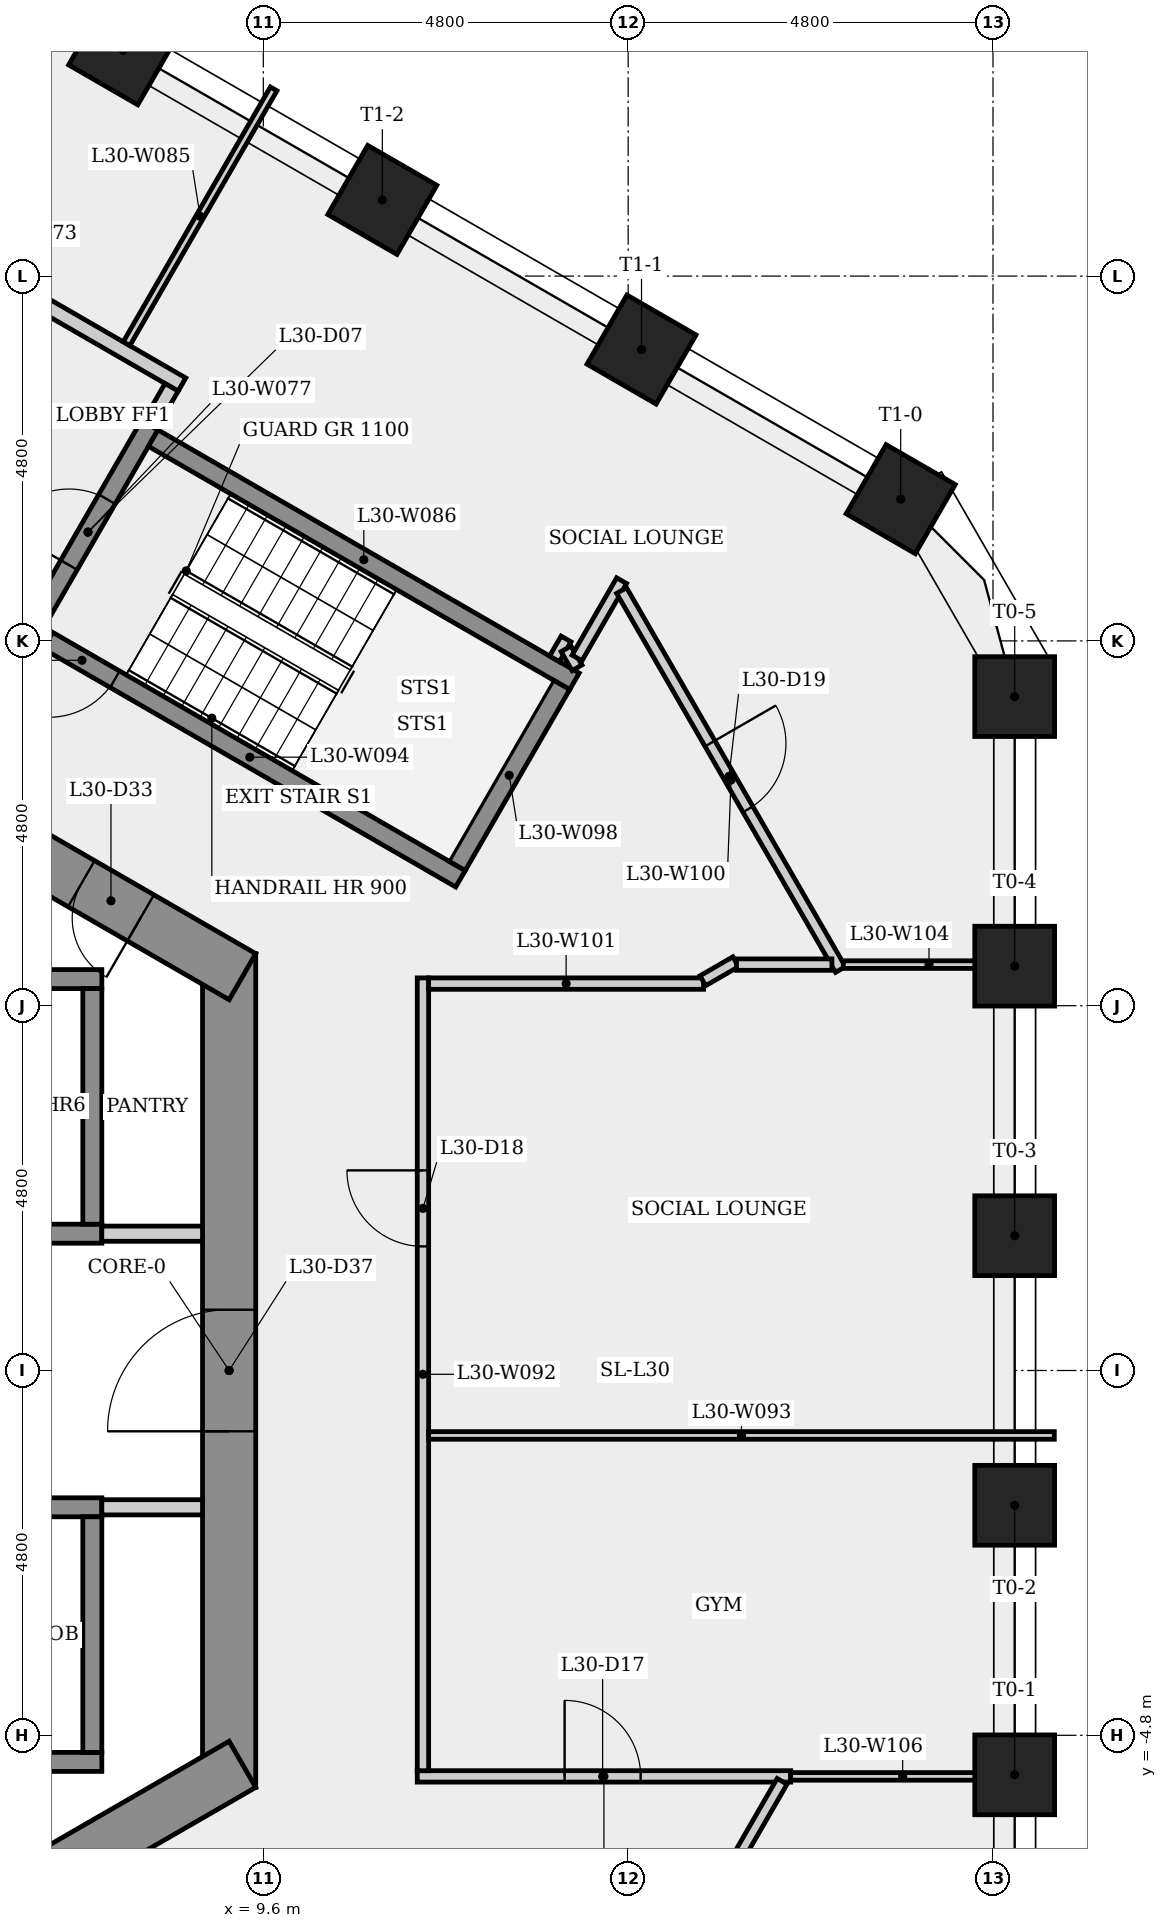
"""IFC4 building model, lengths in metres.
Left out: names, types, materials, properties, quantities, classifications, styles, units other than length and angle.
Written with IfcOpenShell. Run it as: python <this file> out.ifc"""

import sys

from ifc_helpers import new_model, si_unit, direction, frame, frame_2d, origin, origin_2d, place, context, subcontext, project, spatial, rectangle, extrude, element, fill, save


model = new_model("IFC4")
c1 = context("Model", 3, precision=1e-05, world=origin(), true_north=direction((0.0, 1.0)))
c2 = subcontext(c1, "Body", "Model", "MODEL_VIEW")
j1 = project(units=[si_unit("LENGTHUNIT", "METRE"), si_unit("PLANEANGLEUNIT", "RADIAN")], contexts=[c1])
p1 = place(None, origin())
s1 = spatial("IfcSite", under=j1, at=p1, CompositionType="ELEMENT")
p2 = place(p1, origin())
s2 = spatial("IfcBuilding", under=s1, at=p2, CompositionType="ELEMENT")
p3 = place(p2, frame((0.0, 0.0, 113.7)))
s3 = spatial("IfcBuildingStorey", under=s2, at=p3, CompositionType="ELEMENT", Elevation=113.7)
p4 = place(p3, frame((9.15, -5.485, 0.0), z_axis=(0.0, 0.0, 1.0), x_axis=(0.0, 1.0, 0.0)))
e1 = element("IfcWall", 1, at=p4, inside=s3, PredefinedType="SHEAR", context=c2, shape_type="SweptSolid", body=[
    extrude(rectangle(XDim=10.97, YDim=0.7, at=frame_2d((5.485, 0.0))), origin(), (0.0, 0.0, 1.0), 3.4),
])
p5 = place(p4, frame((4.685, 0.0, 0.0)))
e2 = element("IfcOpeningElement", 2, at=p5, cuts=e1, PredefinedType="OPENING", context=c2, shape_type="SweptSolid", body=[
    extrude(rectangle(XDim=1.6, YDim=2.1, at=frame_2d((0.8, 1.05))), frame((0.0, 0.36, 0.0), z_axis=(0.0, -1.0, 0.0), x_axis=(1.0, 0.0, 0.0)), (0.0, 0.0, 1.0), 0.72),
])
p6 = place(p3, frame((9.325, 5.182, 0.0), z_axis=(0.0, 0.0, 1.0), x_axis=(-0.866023993627, 0.500002442456, 0.0)))
e3 = element("IfcWall", 3, at=p6, inside=s3, PredefinedType="SHEAR", context=c2, shape_type="SweptSolid", body=[
    extrude(rectangle(XDim=10.97, YDim=0.7, at=frame_2d((5.485, 0.0))), origin(), (0.0, 0.0, 1.0), 3.4),
])
p7 = place(p6, frame((8.267, 0.0, 0.0)))
e4 = element("IfcOpeningElement", 4, at=p7, cuts=e3, PredefinedType="OPENING", context=c2, shape_type="SweptSolid", body=[
    extrude(rectangle(XDim=0.9, YDim=2.1, at=frame_2d((0.45, 1.05))), frame((0.0, 0.36, 0.0), z_axis=(0.0, -1.0, 0.0), x_axis=(1.0, 0.0, 0.0)), (0.0, 0.0, 1.0), 0.72),
])
p8 = place(p6, frame((1.547, 0.0, 0.0)))
e5 = element("IfcOpeningElement", 5, at=p8, cuts=e3, PredefinedType="OPENING", context=c2, shape_type="SweptSolid", body=[
    extrude(rectangle(XDim=0.9, YDim=2.1, at=frame_2d((0.45, 1.05))), frame((0.0, 0.36, 0.0), z_axis=(0.0, -1.0, 0.0), x_axis=(1.0, 0.0, 0.0)), (0.0, 0.0, 1.0), 0.72),
])
p9 = place(p3, frame((-0.175, -10.667, 0.0), z_axis=(0.0, 0.0, 1.0), x_axis=(0.866023993627, 0.500002442456, 0.0)))
e6 = element("IfcWall", 6, at=p9, inside=s3, PredefinedType="SHEAR", context=c2, shape_type="SweptSolid", body=[
    extrude(rectangle(XDim=10.97, YDim=0.7, at=frame_2d((5.485, 0.0))), origin(), (0.0, 0.0, 1.0), 3.4),
])
p10 = place(p9, frame((6.906, 0.0, 0.0)))
e7 = element("IfcOpeningElement", 7, at=p10, cuts=e6, PredefinedType="OPENING", context=c2, shape_type="SweptSolid", body=[
    extrude(rectangle(XDim=0.9, YDim=2.1, at=frame_2d((0.45, 1.05))), frame((0.0, 0.36, 0.0), z_axis=(0.0, -1.0, 0.0), x_axis=(1.0, 0.0, 0.0)), (0.0, 0.0, 1.0), 0.72),
])
for number, where, z_axis, x_axis in (
    (8, (19.486, -5.32, 0.0), (0.0, 0.0, 1.0), (1.0, 0.0, 0.0)),
    (9, (19.486, -1.773, 0.0), (0.0, 0.0, 1.0), (1.0, 0.0, 0.0)),
    (10, (19.486, 1.773, 0.0), (0.0, 0.0, 1.0), (1.0, 0.0, 0.0)),
    (11, (19.486, 5.32, 0.0), (0.0, 0.0, 1.0), (1.0, 0.0, 0.0)),
    (12, (19.486, 8.867, 0.0), (0.0, 0.0, 1.0), (1.0, 0.0, 0.0)),
    (13, (17.986, 11.465, 0.0), (0.0, 0.0, 1.0), (0.5, 0.866, 0.0)),
    (14, (14.576, 13.434, 0.0), (0.0, 0.0, 1.0), (0.5, 0.866, 0.0)),
    (15, (11.166, 15.402, 0.0), (0.0, 0.0, 1.0), (0.5, 0.866, 0.0)),
    (16, (7.756, 17.371, 0.0), (0.0, 0.0, 1.0), (0.5, 0.866, 0.0)),
):
    element("IfcColumn", number, at=place(p3, frame(where, z_axis=z_axis, x_axis=x_axis)), inside=s3, PredefinedType="COLUMN", context=c2, shape_type="SweptSolid", body=[
        extrude(rectangle(XDim=1.05, YDim=1.05, at=origin_2d()), origin(), (0.0, 0.0, 1.0), 3.4),
    ])
p11 = place(p3, frame((-7.475, 1.8, 0.0), z_axis=(0.0, 0.0, 1.0), x_axis=(1.0, 0.0, 0.0)))
e17 = element("IfcWall", 17, at=p11, inside=s3, PredefinedType="SHEAR", context=c2, shape_type="SweptSolid", body=[
    extrude(rectangle(XDim=14.95, YDim=0.25, at=frame_2d((7.475, 0.0))), origin(), (0.0, 0.0, 1.0), 3.05),
])
for number, where, z_axis, x_axis in (
    (18, (-7.225, 5.15, 0.0), (0.0, 0.0, 1.0), (1.0, 0.0, 0.0)),
    (19, (-7.225, -5.15, 0.0), (0.0, 0.0, 1.0), (1.0, 0.0, 0.0)),
):
    element("IfcWall", number, at=place(p3, frame(where, z_axis=z_axis, x_axis=x_axis)), inside=s3, PredefinedType="SHEAR", context=c2, shape_type="SweptSolid", body=[
        extrude(rectangle(XDim=14.7, YDim=0.25, at=frame_2d((7.35, 0.0))), origin(), (0.0, 0.0, 1.0), 3.05),
    ])
p12 = place(p3, frame((-7.225, -1.8, 0.0), z_axis=(0.0, 0.0, 1.0), x_axis=(1.0, 0.0, 0.0)))
e20 = element("IfcWall", 20, at=p12, inside=s3, PredefinedType="SHEAR", context=c2, shape_type="SweptSolid", body=[
    extrude(rectangle(XDim=14.7, YDim=0.25, at=frame_2d((7.35, 0.0))), origin(), (0.0, 0.0, 1.0), 3.05),
])
p13 = place(p12, frame((0.597, 0.0, 0.0)))
e21 = element("IfcOpeningElement", 21, at=p13, cuts=e20, PredefinedType="OPENING", context=c2, shape_type="SweptSolid", body=[
    extrude(rectangle(XDim=1.1, YDim=2.1, at=frame_2d((0.55, 1.05))), frame((0.0, 0.135, 0.0), z_axis=(0.0, -1.0, 0.0), x_axis=(1.0, 0.0, 0.0)), (0.0, 0.0, 1.0), 0.27),
])
p14 = place(p12, frame((3.0, 0.0, 0.0)))
e22 = element("IfcOpeningElement", 22, at=p14, cuts=e20, PredefinedType="OPENING", context=c2, shape_type="SweptSolid", body=[
    extrude(rectangle(XDim=1.1, YDim=2.1, at=frame_2d((0.55, 1.05))), frame((0.0, 0.135, 0.0), z_axis=(0.0, -1.0, 0.0), x_axis=(1.0, 0.0, 0.0)), (0.0, 0.0, 1.0), 0.27),
])
p15 = place(p12, frame((5.45, 0.0, 0.0)))
e23 = element("IfcOpeningElement", 23, at=p15, cuts=e20, PredefinedType="OPENING", context=c2, shape_type="SweptSolid", body=[
    extrude(rectangle(XDim=1.1, YDim=2.1, at=frame_2d((0.55, 1.05))), frame((0.0, 0.135, 0.0), z_axis=(0.0, -1.0, 0.0), x_axis=(1.0, 0.0, 0.0)), (0.0, 0.0, 1.0), 0.27),
])
p16 = place(p12, frame((7.9, 0.0, 0.0)))
e24 = element("IfcOpeningElement", 24, at=p16, cuts=e20, PredefinedType="OPENING", context=c2, shape_type="SweptSolid", body=[
    extrude(rectangle(XDim=1.1, YDim=2.1, at=frame_2d((0.55, 1.05))), frame((0.0, 0.135, 0.0), z_axis=(0.0, -1.0, 0.0), x_axis=(1.0, 0.0, 0.0)), (0.0, 0.0, 1.0), 0.27),
])
p17 = place(p12, frame((10.35, 0.0, 0.0)))
e25 = element("IfcOpeningElement", 25, at=p17, cuts=e20, PredefinedType="OPENING", context=c2, shape_type="SweptSolid", body=[
    extrude(rectangle(XDim=1.1, YDim=2.1, at=frame_2d((0.55, 1.05))), frame((0.0, 0.135, 0.0), z_axis=(0.0, -1.0, 0.0), x_axis=(1.0, 0.0, 0.0)), (0.0, 0.0, 1.0), 0.27),
])
p18 = place(p3, frame((4.459, 15.323, 0.0), z_axis=(0.0, 0.0, 1.0), x_axis=(0.866016039709, -0.500016218704, 0.0)))
e26 = element("IfcWall", 26, at=p18, inside=s3, PredefinedType="PARTITIONING", context=c2, shape_type="SweptSolid", body=[
    extrude(rectangle(XDim=4.7, YDim=0.2, at=frame_2d((2.35, 0.0))), origin(), (0.0, 0.0, 1.0), 3.05),
])
p19 = place(p3, frame((6.48, 9.624, 0.0), z_axis=(0.0, 0.0, 1.0), x_axis=(0.500017246033, 0.866015446554, 0.0)))
e27 = element("IfcWall", 27, at=p19, inside=s3, PredefinedType="SHEAR", context=c2, shape_type="SweptSolid", body=[
    extrude(rectangle(XDim=3.25, YDim=0.25, at=frame_2d((1.625, 0.0))), origin(), (0.0, 0.0, 1.0), 3.05),
])
p20 = place(p19, frame((1.125, 0.0, 0.0)))
e28 = element("IfcOpeningElement", 28, at=p20, cuts=e27, PredefinedType="OPENING", context=c2, shape_type="SweptSolid", body=[
    extrude(rectangle(XDim=1.0, YDim=2.1, at=frame_2d((0.5, 1.05))), frame((0.0, 0.135, 0.0), z_axis=(0.0, -1.0, 0.0), x_axis=(1.0, 0.0, 0.0)), (0.0, 0.0, 1.0), 0.27),
])
p21 = place(p3, frame((7.475, 1.8, 0.0), z_axis=(0.0, 0.0, 1.0), x_axis=(1.0, 0.0, 0.0)))
e29 = element("IfcWall", 29, at=p21, inside=s3, PredefinedType="PARTITIONING", context=c2, shape_type="SweptSolid", body=[
    extrude(rectangle(XDim=1.325, YDim=0.2, at=frame_2d((0.663, 0.0))), origin(), (0.0, 0.0, 1.0), 3.05),
])
for number, where, z_axis, x_axis in (
    (30, (7.35, -1.925, 0.0), (0.0, 0.0, 1.0), (0.0, -1.0, 0.0)),
    (31, (7.35, 5.025, 0.0), (0.0, 0.0, 1.0), (0.0, -1.0, 0.0)),
):
    element("IfcWall", number, at=place(p3, frame(where, z_axis=z_axis, x_axis=x_axis)), inside=s3, PredefinedType="SHEAR", context=c2, shape_type="SweptSolid", body=[
        extrude(rectangle(XDim=3.1, YDim=0.25, at=frame_2d((1.55, 0.0))), origin(), (0.0, 0.0, 1.0), 3.4),
    ])
p22 = place(p3, frame((7.8, 13.51, 0.0), z_axis=(0.0, 0.0, 1.0), x_axis=(0.499977146319, 0.866038597961, 0.0)))
e32 = element("IfcWall", 32, at=p22, inside=s3, PredefinedType="PARTITIONING", context=c2, shape_type="SweptSolid", body=[
    extrude(rectangle(XDim=3.872, YDim=0.1, at=frame_2d((1.936, 0.0))), origin(), (0.0, 0.0, 1.0), 3.05),
])
p23 = place(p3, frame((8.151, 12.268, 0.0), z_axis=(0.0, 0.0, 1.0), x_axis=(0.866025499775, -0.499999833739, 0.0)))
e33 = element("IfcWall", 33, at=p23, inside=s3, PredefinedType="SHEAR", context=c2, shape_type="SweptSolid", body=[
    extrude(rectangle(XDim=6.4, YDim=0.25, at=frame_2d((3.2, 0.0))), origin(), (0.0, 0.0, 1.0), 3.05),
])
p24 = place(p3, frame((8.393, 12.937, 0.0), z_axis=(0.0, 0.0, 1.0), x_axis=(-0.500065409566, -0.86598763626, 0.0)))
e34 = element("IfcWall", 34, at=p24, inside=s3, PredefinedType="PARTITIONING", context=c2, shape_type="SweptSolid", body=[
    extrude(rectangle(XDim=0.575, YDim=0.2, at=frame_2d((0.288, 0.0))), origin(), (0.0, 0.0, 1.0), 3.05),
])
p25 = place(p3, frame((8.8, -1.8, 0.0), z_axis=(0.0, 0.0, 1.0), x_axis=(-1.0, 0.0, 0.0)))
e35 = element("IfcWall", 35, at=p25, inside=s3, PredefinedType="PARTITIONING", context=c2, shape_type="SweptSolid", body=[
    extrude(rectangle(XDim=1.325, YDim=0.2, at=frame_2d((0.663, 0.0))), origin(), (0.0, 0.0, 1.0), 3.05),
])
p26 = place(p3, frame((11.625, -5.341, 0.0), z_axis=(0.0, 0.0, 1.0), x_axis=(1.0, 0.0, 0.0)))
e36 = element("IfcWall", 36, at=p26, inside=s3, PredefinedType="PARTITIONING", context=c2, shape_type="SweptSolid", body=[
    extrude(rectangle(XDim=4.913, YDim=0.15, at=frame_2d((2.457, 0.0))), origin(), (0.0, 0.0, 1.0), 3.05),
])
p27 = place(p26, frame((1.939, 0.0, 0.0)))
e37 = element("IfcOpeningElement", 37, at=p27, cuts=e36, PredefinedType="OPENING", context=c2, shape_type="SweptSolid", body=[
    extrude(rectangle(XDim=1.0, YDim=2.1, at=frame_2d((0.5, 1.05))), frame((0.0, 0.085, 0.0), z_axis=(0.0, -1.0, 0.0), x_axis=(1.0, 0.0, 0.0)), (0.0, 0.0, 1.0), 0.17),
])
p28 = place(p3, frame((11.7, -5.266, 0.0), z_axis=(0.0, 0.0, 1.0), x_axis=(0.0, 1.0, 0.0)))
e38 = element("IfcWall", 38, at=p28, inside=s3, PredefinedType="PARTITIONING", context=c2, shape_type="SweptSolid", body=[
    extrude(rectangle(XDim=10.431, YDim=0.15, at=frame_2d((5.216, 0.0))), origin(), (0.0, 0.0, 1.0), 3.05),
])
p29 = place(p28, frame((6.899, 0.0, 0.0)))
e39 = element("IfcOpeningElement", 39, at=p29, cuts=e38, PredefinedType="OPENING", context=c2, shape_type="SweptSolid", body=[
    extrude(rectangle(XDim=1.0, YDim=2.1, at=frame_2d((0.5, 1.05))), frame((0.0, 0.085, 0.0), z_axis=(0.0, -1.0, 0.0), x_axis=(1.0, 0.0, 0.0)), (0.0, 0.0, 1.0), 0.17),
])
p30 = place(p3, frame((11.775, -0.854, 0.0), z_axis=(0.0, 0.0, 1.0), x_axis=(1.0, 0.0, 0.0)))
e40 = element("IfcWall", 40, at=p30, inside=s3, PredefinedType="PARTITIONING", context=c2, shape_type="SweptSolid", body=[
    extrude(rectangle(XDim=8.232, YDim=0.1, at=frame_2d((4.116, 0.0))), origin(), (0.0, 0.0, 1.0), 3.05),
])
p31 = place(p3, frame((12.194, 6.47, 0.0), z_axis=(0.0, 0.0, 1.0), x_axis=(-0.866025499775, 0.499999833739, 0.0)))
e41 = element("IfcWall", 41, at=p31, inside=s3, PredefinedType="SHEAR", context=c2, shape_type="SweptSolid", body=[
    extrude(rectangle(XDim=6.4, YDim=0.25, at=frame_2d((3.2, 0.0))), origin(), (0.0, 0.0, 1.0), 3.05),
])
p32 = place(p31, frame((5.25, 0.0, 0.0)))
e42 = element("IfcOpeningElement", 42, at=p32, cuts=e41, PredefinedType="OPENING", context=c2, shape_type="SweptSolid", body=[
    extrude(rectangle(XDim=1.0, YDim=2.1, at=frame_2d((0.5, 1.05))), frame((0.0, 0.135, 0.0), z_axis=(0.0, -1.0, 0.0), x_axis=(1.0, 0.0, 0.0)), (0.0, 0.0, 1.0), 0.27),
])
p33 = place(p3, frame((13.431, 9.364, 0.0), z_axis=(0.0, 0.0, 1.0), x_axis=(0.49995513091, 0.866051307416, 0.0)))
e43 = element("IfcWall", 43, at=p33, inside=s3, PredefinedType="PARTITIONING", context=c2, shape_type="SweptSolid", body=[
    extrude(rectangle(XDim=0.303, YDim=0.15, at=frame_2d((0.151, 0.0))), origin(), (0.0, 0.0, 1.0), 3.05),
])
p34 = place(p3, frame((13.583, 9.496, 0.0), z_axis=(0.0, 0.0, 1.0), x_axis=(0.499868889286, -0.866101087359, 0.0)))
e44 = element("IfcWall", 44, at=p34, inside=s3, PredefinedType="PARTITIONING", context=c2, shape_type="SweptSolid", body=[
    extrude(rectangle(XDim=0.289, YDim=0.15, at=frame_2d((0.144, 0.0))), origin(), (0.0, 0.0, 1.0), 3.05),
])
p35 = place(p3, frame((13.523, 9.022, 0.0), z_axis=(0.0, 0.0, 1.0), x_axis=(-0.500034990121, -0.866005201286, 0.0)))
e45 = element("IfcWall", 45, at=p35, inside=s3, PredefinedType="SHEAR", context=c2, shape_type="SweptSolid", body=[
    extrude(rectangle(XDim=2.75, YDim=0.25, at=frame_2d((1.375, 0.0))), origin(), (0.0, 0.0, 1.0), 3.05),
])
p36 = place(p3, frame((13.727, 9.376, 0.0), z_axis=(0.0, 0.0, 1.0), x_axis=(0.499986503906, 0.866033195618, 0.0)))
e46 = element("IfcWall", 46, at=p36, inside=s3, PredefinedType="PARTITIONING", context=c2, shape_type="SweptSolid", body=[
    extrude(rectangle(XDim=1.174, YDim=0.15, at=frame_2d((0.587, 0.0))), origin(), (0.0, 0.0, 1.0), 3.05),
])
p37 = place(p3, frame((14.314, 10.263, 0.0), z_axis=(0.0, 0.0, 1.0), x_axis=(0.500001380108, -0.866024606977, 0.0)))
e47 = element("IfcWall", 47, at=p37, inside=s3, PredefinedType="PARTITIONING", context=c2, shape_type="SweptSolid", body=[
    extrude(rectangle(XDim=5.758, YDim=0.15, at=frame_2d((2.879, 0.0))), origin(), (0.0, 0.0, 1.0), 3.05),
])
p38 = place(p37, frame((2.324, 0.0, 0.0)))
e48 = element("IfcOpeningElement", 48, at=p38, cuts=e47, PredefinedType="OPENING", context=c2, shape_type="SweptSolid", body=[
    extrude(rectangle(XDim=1.0, YDim=2.1, at=frame_2d((0.5, 1.05))), frame((0.0, 0.085, 0.0), z_axis=(0.0, -1.0, 0.0), x_axis=(1.0, 0.0, 0.0)), (0.0, 0.0, 1.0), 0.17),
])
p39 = place(p3, frame((15.392, 5.091, 0.0), z_axis=(0.0, 0.0, 1.0), x_axis=(-1.0, 0.0, 0.0)))
e49 = element("IfcWall", 49, at=p39, inside=s3, PredefinedType="PARTITIONING", context=c2, shape_type="SweptSolid", body=[
    extrude(rectangle(XDim=3.617, YDim=0.15, at=frame_2d((1.809, 0.0))), origin(), (0.0, 0.0, 1.0), 3.05),
])
p40 = place(p3, frame((15.815, 5.378, 0.0), z_axis=(0.0, 0.0, 1.0), x_axis=(-0.865949687125, -0.500131122175, 0.0)))
e50 = element("IfcWall", 50, at=p40, inside=s3, PredefinedType="PARTITIONING", context=c2, shape_type="SweptSolid", body=[
    extrude(rectangle(XDim=0.5, YDim=0.15, at=frame_2d((0.25, 0.0))), origin(), (0.0, 0.0, 1.0), 3.05),
])
p41 = place(p3, frame((16.425, -5.406, 0.0), z_axis=(0.0, 0.0, 1.0), x_axis=(-0.499996516801, -0.866027414801, 0.0)))
e51 = element("IfcWall", 51, at=p41, inside=s3, PredefinedType="PARTITIONING", context=c2, shape_type="SweptSolid", body=[
    extrude(rectangle(XDim=8.379, YDim=0.15, at=frame_2d((4.19, 0.0))), origin(), (0.0, 0.0, 1.0), 3.05),
])
p42 = place(p41, frame((3.69, 0.0, 0.0)))
e52 = element("IfcOpeningElement", 52, at=p42, cuts=e51, PredefinedType="OPENING", context=c2, shape_type="SweptSolid", body=[
    extrude(rectangle(XDim=1.0, YDim=2.1, at=frame_2d((0.5, 1.05))), frame((0.0, 0.085, 0.0), z_axis=(0.0, -1.0, 0.0), x_axis=(1.0, 0.0, 0.0)), (0.0, 0.0, 1.0), 0.17),
])
p43 = place(p3, frame((17.23, 5.341, 0.0), z_axis=(0.0, 0.0, 1.0), x_axis=(1.0, 0.0, 0.0)))
e53 = element("IfcWall", 53, at=p43, inside=s3, PredefinedType="PARTITIONING", context=c2, shape_type="SweptSolid", body=[
    extrude(rectangle(XDim=2.255, YDim=0.1, at=frame_2d((1.127, 0.0))), origin(), (0.0, 0.0, 1.0), 3.05),
])
p44 = place(p3, frame((17.081, 5.341, 0.0), z_axis=(0.0, 0.0, 1.0), x_axis=(-1.0, 0.0, 0.0)))
e54 = element("IfcWall", 54, at=p44, inside=s3, PredefinedType="PARTITIONING", context=c2, shape_type="SweptSolid", body=[
    extrude(rectangle(XDim=1.255, YDim=0.15, at=frame_2d((0.627, 0.0))), origin(), (0.0, 0.0, 1.0), 3.05),
])
p45 = place(p3, frame((19.486, -5.341, 0.0), z_axis=(0.0, 0.0, 1.0), x_axis=(-1.0, 0.0, 0.0)))
e55 = element("IfcWall", 55, at=p45, inside=s3, PredefinedType="PARTITIONING", context=c2, shape_type="SweptSolid", body=[
    extrude(rectangle(XDim=2.948, YDim=0.1, at=frame_2d((1.474, 0.0))), origin(), (0.0, 0.0, 1.0), 3.05),
])
p46 = place(p32, origin())
e56 = element("IfcDoor", 56, at=p46, inside=s3, OperationType="SINGLE_SWING_RIGHT", PredefinedType="DOOR", context=c2, shape_type="SweptSolid", body=[
    extrude(rectangle(XDim=1.0, YDim=2.1, at=frame_2d((0.5, 1.05))), frame((0.0, 0.025, 0.0), z_axis=(0.0, -1.0, 0.0), x_axis=(1.0, 0.0, 0.0)), (0.0, 0.0, 1.0), 0.05),
])
fill(e42, e56)
p47 = place(p20, origin())
e57 = element("IfcDoor", 57, at=p47, inside=s3, OperationType="SINGLE_SWING_LEFT", PredefinedType="DOOR", context=c2, shape_type="SweptSolid", body=[
    extrude(rectangle(XDim=1.0, YDim=2.1, at=frame_2d((0.5, 1.05))), frame((0.0, 0.025, 0.0), z_axis=(0.0, -1.0, 0.0), x_axis=(1.0, 0.0, 0.0)), (0.0, 0.0, 1.0), 0.05),
])
fill(e28, e57)
p48 = place(p27, origin())
e58 = element("IfcDoor", 58, at=p48, inside=s3, OperationType="SINGLE_SWING_LEFT", PredefinedType="DOOR", context=c2, shape_type="SweptSolid", body=[
    extrude(rectangle(XDim=1.0, YDim=2.1, at=frame_2d((0.5, 1.05))), frame((0.0, 0.025, 0.0), z_axis=(0.0, -1.0, 0.0), x_axis=(1.0, 0.0, 0.0)), (0.0, 0.0, 1.0), 0.05),
])
fill(e37, e58)
p49 = place(p29, origin())
e59 = element("IfcDoor", 59, at=p49, inside=s3, OperationType="SINGLE_SWING_RIGHT", PredefinedType="DOOR", context=c2, shape_type="SweptSolid", body=[
    extrude(rectangle(XDim=1.0, YDim=2.1, at=frame_2d((0.5, 1.05))), frame((0.0, 0.025, 0.0), z_axis=(0.0, -1.0, 0.0), x_axis=(1.0, 0.0, 0.0)), (0.0, 0.0, 1.0), 0.05),
])
fill(e39, e59)
p50 = place(p38, origin())
e60 = element("IfcDoor", 60, at=p50, inside=s3, OperationType="SINGLE_SWING_LEFT", PredefinedType="DOOR", context=c2, shape_type="SweptSolid", body=[
    extrude(rectangle(XDim=1.0, YDim=2.1, at=frame_2d((0.5, 1.05))), frame((0.0, 0.025, 0.0), z_axis=(0.0, -1.0, 0.0), x_axis=(1.0, 0.0, 0.0)), (0.0, 0.0, 1.0), 0.05),
])
fill(e48, e60)
p51 = place(p8, origin())
e61 = element("IfcDoor", 61, at=p51, inside=s3, OperationType="SINGLE_SWING_LEFT", PredefinedType="DOOR", context=c2, shape_type="SweptSolid", body=[
    extrude(rectangle(XDim=0.9, YDim=2.1, at=frame_2d((0.45, 1.05))), frame((0.0, 0.025, 0.0), z_axis=(0.0, -1.0, 0.0), x_axis=(1.0, 0.0, 0.0)), (0.0, 0.0, 1.0), 0.05),
])
fill(e5, e61)
p52 = place(p5, origin())
e62 = element("IfcDoor", 62, at=p52, inside=s3, OperationType="SINGLE_SWING_LEFT", PredefinedType="DOOR", context=c2, shape_type="SweptSolid", body=[
    extrude(rectangle(XDim=1.6, YDim=2.1, at=frame_2d((0.8, 1.05))), frame((0.0, 0.025, 0.0), z_axis=(0.0, -1.0, 0.0), x_axis=(1.0, 0.0, 0.0)), (0.0, 0.0, 1.0), 0.05),
])
fill(e2, e62)
save(model, sys.argv[1])
